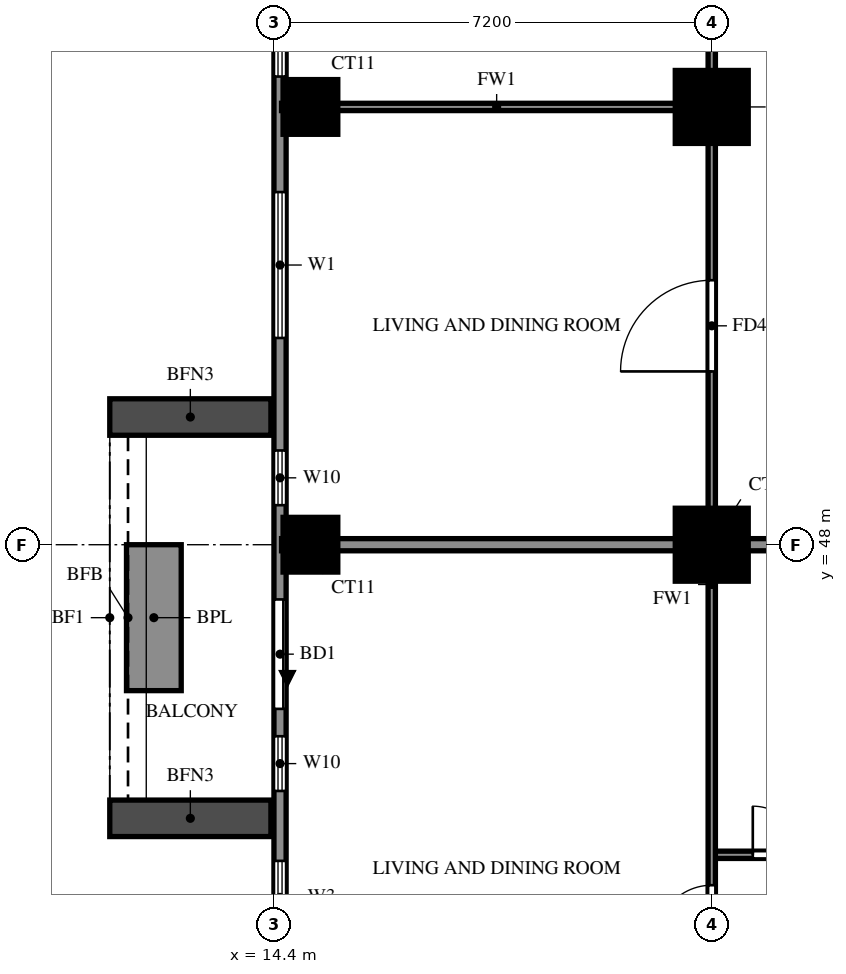
"""IFC4 building model, lengths in metres.
Left out: names, types, materials, properties, quantities, classifications, styles, units other than length and angle.
Written with IfcOpenShell. Run it as: python <this file> out.ifc"""

import sys

from ifc_helpers import new_model, si_unit, direction, frame, frame_2d, origin, origin_2d, place, context, subcontext, project, spatial, rectangle, extrude, source, transform, mapped, element, fill, save


model = new_model("IFC4")
c1 = context("Model", 3, precision=1e-05, world=origin(), true_north=direction((0.0, 1.0)))
c2 = subcontext(c1, "Body", "Model", "MODEL_VIEW")
j1 = project(units=[si_unit("LENGTHUNIT", "METRE"), si_unit("PLANEANGLEUNIT", "RADIAN")], contexts=[c1])
p1 = place(None, origin())
s1 = spatial("IfcSite", under=j1, at=p1, CompositionType="ELEMENT")
p2 = place(p1, origin())
s2 = spatial("IfcBuilding", under=s1, at=p2, CompositionType="ELEMENT")
p3 = place(p2, frame((0.0, 0.0, 93.5)))
s3 = spatial("IfcBuildingStorey", under=s2, at=p3, CompositionType="ELEMENT", Elevation=93.5)
m1 = source(origin(), c2, "Body", "SweptSolid", [
    extrude(rectangle(XDim=0.9, YDim=0.9, at=origin_2d()), origin(), (0.0, 0.0, 1.0), 3.18),
])
p4 = place(p3, frame((15.0, 48.0, 0.0), z_axis=(0.0, 0.0, 1.0), x_axis=(1.0, 0.0, 0.0)))
e1 = element("IfcColumn", 1, at=p4, inside=s3, PredefinedType="COLUMN", context=c2, shape_type="MappedRepresentation", body=[
    mapped(m1, transform((0.0, 0.0, 0.0))),
])
m2 = source(origin(), c2, "Body", "SweptSolid", [
    extrude(rectangle(XDim=1.2, YDim=1.2, at=origin_2d()), origin(), (0.0, 0.0, 1.0), 3.18),
])
p5 = place(p3, frame((21.6, 48.0, 0.0), z_axis=(0.0, 0.0, 1.0), x_axis=(1.0, 0.0, 0.0)))
e2 = element("IfcColumn", 2, at=p5, inside=s3, PredefinedType="COLUMN", context=c2, shape_type="MappedRepresentation", body=[
    mapped(m2, transform((0.0, 0.0, 0.0))),
])
p6 = place(p3, frame((15.0, 55.2, 0.0), z_axis=(0.0, 0.0, 1.0), x_axis=(1.0, 0.0, 0.0)))
e3 = element("IfcColumn", 3, at=p6, inside=s3, PredefinedType="COLUMN", context=c2, shape_type="MappedRepresentation", body=[
    mapped(m1, transform((0.0, 0.0, 0.0))),
])
p7 = place(p3, frame((21.6, 55.2, 0.0), z_axis=(0.0, 0.0, 1.0), x_axis=(1.0, 0.0, 0.0)))
e4 = element("IfcColumn", 4, at=p7, inside=s3, PredefinedType="COLUMN", context=c2, shape_type="MappedRepresentation", body=[
    mapped(m2, transform((0.0, 0.0, 0.0))),
])
p8 = place(p3, frame((14.5, 76.6, 0.0), z_axis=(0.0, 0.0, 1.0), x_axis=(0.0, -1.0, 0.0)))
e5 = element("IfcWall", 5, at=p8, inside=s3, PredefinedType="SOLIDWALL", context=c2, shape_type="SweptSolid", body=[
    extrude(rectangle(XDim=39.4, YDim=0.2, at=frame_2d((19.7, 0.0))), origin(), (0.0, 0.0, 1.0), 3.18),
])
p9 = place(p8, frame((15.1, 0.0, 0.0)))
e6 = element("IfcOpeningElement", 6, at=p9, cuts=e5, PredefinedType="OPENING", context=c2, shape_type="SweptSolid", body=[
    extrude(rectangle(XDim=1.8, YDim=2.4, at=frame_2d((0.9, 1.2))), frame((0.0, 0.11, 0.0), z_axis=(0.0, -1.0, 0.0), x_axis=(1.0, 0.0, 0.0)), (0.0, 0.0, 1.0), 0.22),
])
p10 = place(p8, frame((29.5, 0.0, 0.0)))
e7 = element("IfcOpeningElement", 7, at=p10, cuts=e5, PredefinedType="OPENING", context=c2, shape_type="SweptSolid", body=[
    extrude(rectangle(XDim=1.8, YDim=2.4, at=frame_2d((0.9, 1.2))), frame((0.0, 0.11, 0.0), z_axis=(0.0, -1.0, 0.0), x_axis=(1.0, 0.0, 0.0)), (0.0, 0.0, 1.0), 0.22),
])
p11 = place(p8, frame((31.75, 0.0, 0.6)))
e8 = element("IfcOpeningElement", 8, at=p11, cuts=e5, PredefinedType="OPENING", context=c2, shape_type="SweptSolid", body=[
    extrude(rectangle(XDim=0.9, YDim=2.4, at=frame_2d((0.45, 1.2))), frame((0.0, 0.11, 0.0), z_axis=(0.0, -1.0, 0.0), x_axis=(1.0, 0.0, 0.0)), (0.0, 0.0, 1.0), 0.22),
])
p12 = place(p8, frame((33.8, 0.0, 0.6)))
e9 = element("IfcOpeningElement", 9, at=p12, cuts=e5, PredefinedType="OPENING", context=c2, shape_type="SweptSolid", body=[
    extrude(rectangle(XDim=1.2, YDim=2.4, at=frame_2d((0.6, 1.2))), frame((0.0, 0.11, 0.0), z_axis=(0.0, -1.0, 0.0), x_axis=(1.0, 0.0, 0.0)), (0.0, 0.0, 1.0), 0.22),
])
p13 = place(p8, frame((36.8, 0.0, 0.6)))
e10 = element("IfcOpeningElement", 10, at=p13, cuts=e5, PredefinedType="OPENING", context=c2, shape_type="SweptSolid", body=[
    extrude(rectangle(XDim=1.8, YDim=2.4, at=frame_2d((0.9, 1.2))), frame((0.0, 0.11, 0.0), z_axis=(0.0, -1.0, 0.0), x_axis=(1.0, 0.0, 0.0)), (0.0, 0.0, 1.0), 0.22),
])
p14 = place(p8, frame((22.8, 0.0, 0.6)))
e11 = element("IfcOpeningElement", 11, at=p14, cuts=e5, PredefinedType="OPENING", context=c2, shape_type="SweptSolid", body=[
    extrude(rectangle(XDim=2.4, YDim=2.4, at=frame_2d((1.2, 1.2))), frame((0.0, 0.11, 0.0), z_axis=(0.0, -1.0, 0.0), x_axis=(1.0, 0.0, 0.0)), (0.0, 0.0, 1.0), 0.22),
])
p15 = place(p8, frame((27.05, 0.0, 0.6)))
e12 = element("IfcOpeningElement", 12, at=p15, cuts=e5, PredefinedType="OPENING", context=c2, shape_type="SweptSolid", body=[
    extrude(rectangle(XDim=0.9, YDim=2.4, at=frame_2d((0.45, 1.2))), frame((0.0, 0.11, 0.0), z_axis=(0.0, -1.0, 0.0), x_axis=(1.0, 0.0, 0.0)), (0.0, 0.0, 1.0), 0.22),
])
p16 = place(p8, frame((19.1, 0.0, 0.6)))
e13 = element("IfcOpeningElement", 13, at=p16, cuts=e5, PredefinedType="OPENING", context=c2, shape_type="SweptSolid", body=[
    extrude(rectangle(XDim=1.8, YDim=2.4, at=frame_2d((0.9, 1.2))), frame((0.0, 0.11, 0.0), z_axis=(0.0, -1.0, 0.0), x_axis=(1.0, 0.0, 0.0)), (0.0, 0.0, 1.0), 0.22),
])
p17 = place(p8, frame((10.75, 0.0, 1.5)))
e14 = element("IfcOpeningElement", 14, at=p17, cuts=e5, PredefinedType="OPENING", context=c2, shape_type="SweptSolid", body=[
    extrude(rectangle(XDim=0.9, YDim=0.9, at=frame_2d((0.45, 0.45))), frame((0.0, 0.11, 0.0), z_axis=(0.0, -1.0, 0.0), x_axis=(1.0, 0.0, 0.0)), (0.0, 0.0, 1.0), 0.22),
])
p18 = place(p8, frame((12.65, 0.0, 1.5)))
e15 = element("IfcOpeningElement", 15, at=p18, cuts=e5, PredefinedType="OPENING", context=c2, shape_type="SweptSolid", body=[
    extrude(rectangle(XDim=0.9, YDim=0.9, at=frame_2d((0.45, 0.45))), frame((0.0, 0.11, 0.0), z_axis=(0.0, -1.0, 0.0), x_axis=(1.0, 0.0, 0.0)), (0.0, 0.0, 1.0), 0.22),
])
p19 = place(p8, frame((7.8, 0.0, 0.6)))
e16 = element("IfcOpeningElement", 16, at=p19, cuts=e5, PredefinedType="OPENING", context=c2, shape_type="SweptSolid", body=[
    extrude(rectangle(XDim=2.4, YDim=2.4, at=frame_2d((1.2, 1.2))), frame((0.0, 0.11, 0.0), z_axis=(0.0, -1.0, 0.0), x_axis=(1.0, 0.0, 0.0)), (0.0, 0.0, 1.0), 0.22),
])
p20 = place(p8, frame((3.8, 0.0, 0.6)))
e17 = element("IfcOpeningElement", 17, at=p20, cuts=e5, PredefinedType="OPENING", context=c2, shape_type="SweptSolid", body=[
    extrude(rectangle(XDim=2.4, YDim=2.4, at=frame_2d((1.2, 1.2))), frame((0.0, 0.11, 0.0), z_axis=(0.0, -1.0, 0.0), x_axis=(1.0, 0.0, 0.0)), (0.0, 0.0, 1.0), 0.22),
])
p21 = place(p8, frame((0.6, 0.0, 0.6)))
e18 = element("IfcOpeningElement", 18, at=p21, cuts=e5, PredefinedType="OPENING", context=c2, shape_type="SweptSolid", body=[
    extrude(rectangle(XDim=2.4, YDim=2.4, at=frame_2d((1.2, 1.2))), frame((0.0, 0.11, 0.0), z_axis=(0.0, -1.0, 0.0), x_axis=(1.0, 0.0, 0.0)), (0.0, 0.0, 1.0), 0.22),
])
for number, where, z_axis, x_axis in (
    (19, (14.35, 50.1, 0.0), (0.0, 0.0, 1.0), (-1.0, 0.0, 0.0)),
    (20, (14.35, 43.5, 0.0), (0.0, 0.0, 1.0), (-1.0, 0.0, 0.0)),
):
    element("IfcWall", number, at=place(p3, frame(where, z_axis=z_axis, x_axis=x_axis)), inside=s3, PredefinedType="SOLIDWALL", context=c2, shape_type="SweptSolid", body=[
        extrude(rectangle(XDim=2.65, YDim=0.6, at=frame_2d((1.325, 0.0))), origin(), (0.0, 0.0, 1.0), 2.85),
    ])
p22 = place(p3, frame((12.425, 48.0, 0.0), z_axis=(0.0, 0.0, 1.0), x_axis=(0.0, -1.0, 0.0)))
e21 = element("IfcWall", 21, at=p22, inside=s3, PredefinedType="SOLIDWALL", context=c2, shape_type="SweptSolid", body=[
    extrude(rectangle(XDim=2.4, YDim=0.9, at=frame_2d((1.2, 0.0))), origin(), (0.0, 0.0, 1.0), 0.9),
])
p23 = place(p3, frame((14.525, 48.0, 0.0), z_axis=(0.0, 0.0, 1.0), x_axis=(1.0, 0.0, 0.0)))
e22 = element("IfcWall", 22, at=p23, inside=s3, PredefinedType="SOLIDWALL", context=c2, shape_type="SweptSolid", body=[
    extrude(rectangle(XDim=19.075, YDim=0.2, at=frame_2d((9.538, 0.0))), origin(), (0.0, 0.0, 1.0), 3.18),
])
p24 = place(p3, frame((21.6, 42.9, 0.0), z_axis=(0.0, 0.0, 1.0), x_axis=(1.0, 0.0, 0.0)))
e23 = element("IfcWall", 23, at=p24, inside=s3, PredefinedType="PARTITIONING", context=c2, shape_type="SweptSolid", body=[
    extrude(rectangle(XDim=12.0, YDim=0.12, at=frame_2d((6.0, 0.0))), origin(), (0.0, 0.0, 1.0), 3.18),
])
p25 = place(p24, frame((0.675, 0.0, 0.0)))
e24 = element("IfcOpeningElement", 24, at=p25, cuts=e23, PredefinedType="OPENING", context=c2, shape_type="SweptSolid", body=[
    extrude(rectangle(XDim=0.8, YDim=2.1, at=frame_2d((0.4, 1.05))), frame((0.0, 0.07, 0.0), z_axis=(0.0, -1.0, 0.0), x_axis=(1.0, 0.0, 0.0)), (0.0, 0.0, 1.0), 0.14),
])
p26 = place(p24, frame((4.0, 0.0, 0.0)))
e25 = element("IfcOpeningElement", 25, at=p26, cuts=e23, PredefinedType="OPENING", context=c2, shape_type="SweptSolid", body=[
    extrude(rectangle(XDim=0.9, YDim=2.1, at=frame_2d((0.45, 1.05))), frame((0.0, 0.07, 0.0), z_axis=(0.0, -1.0, 0.0), x_axis=(1.0, 0.0, 0.0)), (0.0, 0.0, 1.0), 0.14),
])
p27 = place(p24, frame((7.475, 0.0, 0.0)))
e26 = element("IfcOpeningElement", 26, at=p27, cuts=e23, PredefinedType="OPENING", context=c2, shape_type="SweptSolid", body=[
    extrude(rectangle(XDim=0.9, YDim=2.1, at=frame_2d((0.45, 1.05))), frame((0.0, 0.07, 0.0), z_axis=(0.0, -1.0, 0.0), x_axis=(1.0, 0.0, 0.0)), (0.0, 0.0, 1.0), 0.14),
])
p28 = place(p24, frame((10.1, 0.0, 0.0)))
e27 = element("IfcOpeningElement", 27, at=p28, cuts=e23, PredefinedType="OPENING", context=c2, shape_type="SweptSolid", body=[
    extrude(rectangle(XDim=0.9, YDim=2.1, at=frame_2d((0.45, 1.05))), frame((0.0, 0.07, 0.0), z_axis=(0.0, -1.0, 0.0), x_axis=(1.0, 0.0, 0.0)), (0.0, 0.0, 1.0), 0.14),
])
p29 = place(p3, frame((14.525, 55.2, 0.0), z_axis=(0.0, 0.0, 1.0), x_axis=(1.0, 0.0, 0.0)))
e28 = element("IfcWall", 28, at=p29, inside=s3, PredefinedType="PARTITIONING", context=c2, shape_type="SweptSolid", body=[
    extrude(rectangle(XDim=7.075, YDim=0.12, at=frame_2d((3.538, 0.0))), origin(), (0.0, 0.0, 1.0), 3.18),
])
p30 = place(p3, frame((21.6, 33.725, 0.0), z_axis=(0.0, 0.0, 1.0), x_axis=(0.0, 1.0, 0.0)))
e29 = element("IfcWall", 29, at=p30, inside=s3, PredefinedType="PARTITIONING", context=c2, shape_type="SweptSolid", body=[
    extrude(rectangle(XDim=28.675, YDim=0.12, at=frame_2d((14.337, 0.0))), origin(), (0.0, 0.0, 1.0), 3.18),
])
p31 = place(p30, frame((7.775, 0.0, 0.0)))
e30 = element("IfcOpeningElement", 30, at=p31, cuts=e29, PredefinedType="OPENING", context=c2, shape_type="SweptSolid", body=[
    extrude(rectangle(XDim=0.9, YDim=2.1, at=frame_2d((0.45, 1.05))), frame((0.0, 0.07, 0.0), z_axis=(0.0, -1.0, 0.0), x_axis=(1.0, 0.0, 0.0)), (0.0, 0.0, 1.0), 0.14),
])
p32 = place(p30, frame((17.125, 0.0, 0.0)))
e31 = element("IfcOpeningElement", 31, at=p32, cuts=e29, PredefinedType="OPENING", context=c2, shape_type="SweptSolid", body=[
    extrude(rectangle(XDim=1.5, YDim=2.1, at=frame_2d((0.75, 1.05))), frame((0.0, 0.07, 0.0), z_axis=(0.0, -1.0, 0.0), x_axis=(1.0, 0.0, 0.0)), (0.0, 0.0, 1.0), 0.14),
])
p33 = place(p30, frame((22.825, 0.0, 0.0)))
e32 = element("IfcOpeningElement", 32, at=p33, cuts=e29, PredefinedType="OPENING", context=c2, shape_type="SweptSolid", body=[
    extrude(rectangle(XDim=0.9, YDim=2.1, at=frame_2d((0.45, 1.05))), frame((0.0, 0.07, 0.0), z_axis=(0.0, -1.0, 0.0), x_axis=(1.0, 0.0, 0.0)), (0.0, 0.0, 1.0), 0.14),
])
p34 = place(p30, frame((26.425, 0.0, 0.0)))
e33 = element("IfcOpeningElement", 33, at=p34, cuts=e29, PredefinedType="OPENING", context=c2, shape_type="SweptSolid", body=[
    extrude(rectangle(XDim=0.9, YDim=2.1, at=frame_2d((0.45, 1.05))), frame((0.0, 0.07, 0.0), z_axis=(0.0, -1.0, 0.0), x_axis=(1.0, 0.0, 0.0)), (0.0, 0.0, 1.0), 0.14),
])
p35 = place(p10, origin())
e34 = element("IfcDoor", 34, at=p35, inside=s3, OperationType="DOUBLE_DOOR_SLIDING", PredefinedType="DOOR", context=c2, shape_type="SweptSolid", body=[
    extrude(rectangle(XDim=1.8, YDim=2.4, at=frame_2d((0.9, 1.2))), frame((0.0, 0.025, 0.0), z_axis=(0.0, -1.0, 0.0), x_axis=(1.0, 0.0, 0.0)), (0.0, 0.0, 1.0), 0.05),
])
fill(e7, e34)
p36 = place(p11, origin())
e35 = element("IfcWindow", 35, at=p36, inside=s3, PartitioningType="SINGLE_PANEL", PredefinedType="WINDOW", context=c2, shape_type="SweptSolid", body=[
    extrude(rectangle(XDim=0.9, YDim=2.4, at=frame_2d((0.45, 1.2))), frame((0.0, 0.03, 0.0), z_axis=(0.0, -1.0, 0.0), x_axis=(1.0, 0.0, 0.0)), (0.0, 0.0, 1.0), 0.06),
])
fill(e8, e35)
p37 = place(p12, origin())
e36 = element("IfcWindow", 36, at=p37, inside=s3, PartitioningType="SINGLE_PANEL", PredefinedType="WINDOW", context=c2, shape_type="SweptSolid", body=[
    extrude(rectangle(XDim=1.2, YDim=2.4, at=frame_2d((0.6, 1.2))), frame((0.0, 0.03, 0.0), z_axis=(0.0, -1.0, 0.0), x_axis=(1.0, 0.0, 0.0)), (0.0, 0.0, 1.0), 0.06),
])
fill(e9, e36)
p38 = place(p14, origin())
e37 = element("IfcWindow", 37, at=p38, inside=s3, PartitioningType="DOUBLE_PANEL_VERTICAL", PredefinedType="WINDOW", context=c2, shape_type="SweptSolid", body=[
    extrude(rectangle(XDim=2.4, YDim=2.4, at=frame_2d((1.2, 1.2))), frame((0.0, 0.03, 0.0), z_axis=(0.0, -1.0, 0.0), x_axis=(1.0, 0.0, 0.0)), (0.0, 0.0, 1.0), 0.06),
])
fill(e11, e37)
p39 = place(p15, origin())
e38 = element("IfcWindow", 38, at=p39, inside=s3, PartitioningType="SINGLE_PANEL", PredefinedType="WINDOW", context=c2, shape_type="SweptSolid", body=[
    extrude(rectangle(XDim=0.9, YDim=2.4, at=frame_2d((0.45, 1.2))), frame((0.0, 0.03, 0.0), z_axis=(0.0, -1.0, 0.0), x_axis=(1.0, 0.0, 0.0)), (0.0, 0.0, 1.0), 0.06),
])
fill(e12, e38)
p40 = place(p16, origin())
e39 = element("IfcWindow", 39, at=p40, inside=s3, PartitioningType="DOUBLE_PANEL_VERTICAL", PredefinedType="WINDOW", context=c2, shape_type="SweptSolid", body=[
    extrude(rectangle(XDim=1.8, YDim=2.4, at=frame_2d((0.9, 1.2))), frame((0.0, 0.03, 0.0), z_axis=(0.0, -1.0, 0.0), x_axis=(1.0, 0.0, 0.0)), (0.0, 0.0, 1.0), 0.06),
])
fill(e13, e39)
p41 = place(p31, origin())
e40 = element("IfcDoor", 40, at=p41, inside=s3, OperationType="SINGLE_SWING_RIGHT", PredefinedType="DOOR", context=c2, shape_type="SweptSolid", body=[
    extrude(rectangle(XDim=0.9, YDim=2.1, at=frame_2d((0.45, 1.05))), frame((0.0, 0.025, 0.0), z_axis=(0.0, -1.0, 0.0), x_axis=(1.0, 0.0, 0.0)), (0.0, 0.0, 1.0), 0.05),
])
fill(e30, e40)
p42 = place(p25, origin())
e41 = element("IfcDoor", 41, at=p42, inside=s3, OperationType="SINGLE_SWING_LEFT", PredefinedType="DOOR", context=c2, shape_type="SweptSolid", body=[
    extrude(rectangle(XDim=0.8, YDim=2.1, at=frame_2d((0.4, 1.05))), frame((0.0, 0.025, 0.0), z_axis=(0.0, -1.0, 0.0), x_axis=(1.0, 0.0, 0.0)), (0.0, 0.0, 1.0), 0.05),
])
fill(e24, e41)
p43 = place(p32, origin())
e42 = element("IfcDoor", 42, at=p43, inside=s3, OperationType="SINGLE_SWING_LEFT", PredefinedType="DOOR", context=c2, shape_type="SweptSolid", body=[
    extrude(rectangle(XDim=1.5, YDim=2.1, at=frame_2d((0.75, 1.05))), frame((0.0, 0.025, 0.0), z_axis=(0.0, -1.0, 0.0), x_axis=(1.0, 0.0, 0.0)), (0.0, 0.0, 1.0), 0.05),
])
fill(e31, e42)
save(model, sys.argv[1])
